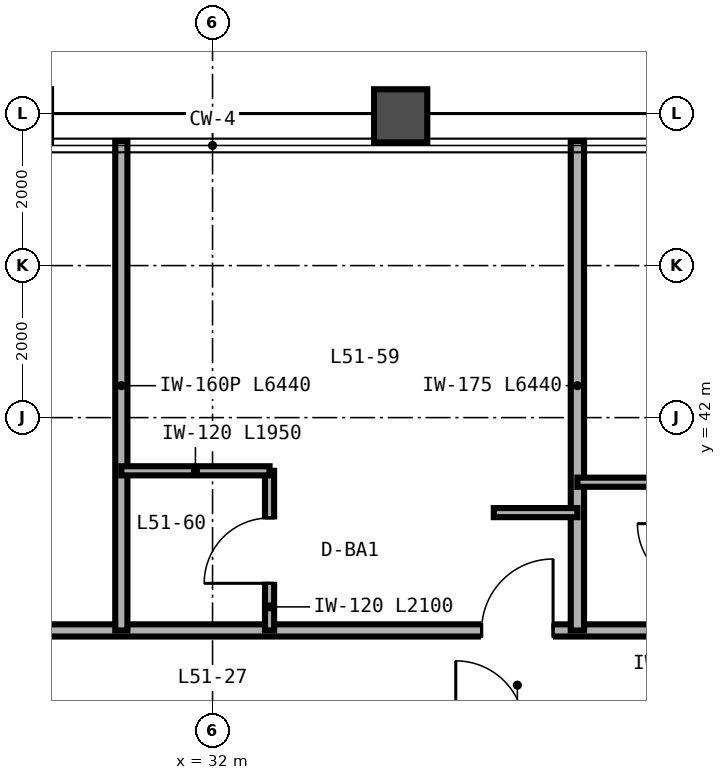
"""IFC4 building model, lengths in metres.
Left out: names, types, materials, properties, quantities, classifications, styles, units other than length and angle.
Written with IfcOpenShell. Run it as: python <this file> out.ifc"""

import sys

from ifc_helpers import new_model, si_unit, direction, frame, frame_2d, origin, place, context, subcontext, project, spatial, rectangle, extrude, source, transform, mapped, element, fill, save


model = new_model("IFC4")
c1 = context("Model", 3, precision=1e-05, world=origin(), true_north=direction((0.0, 1.0)))
c2 = subcontext(c1, "Body", "Model", "MODEL_VIEW")
j1 = project(units=[si_unit("LENGTHUNIT", "METRE"), si_unit("PLANEANGLEUNIT", "RADIAN")], contexts=[c1])
p1 = place(None, origin())
s1 = spatial("IfcSite", under=j1, at=p1, CompositionType="ELEMENT")
p2 = place(p1, origin())
s2 = spatial("IfcBuilding", under=s1, at=p2, CompositionType="ELEMENT")
p3 = place(p2, frame((0.0, 0.0, 202.8)))
s3 = spatial("IfcBuildingStorey", under=s2, at=p3, CompositionType="ELEMENT", Elevation=202.8)
p4 = place(p3, frame((14.0, 39.2, 0.0), z_axis=(0.0, 0.0, 1.0), x_axis=(1.0, 0.0, 0.0)))
e1 = element("IfcWall", 1, at=p4, inside=s3, PredefinedType="PARTITIONING", context=c2, shape_type="SweptSolid", body=[
    extrude(rectangle(XDim=36.0, YDim=0.16, at=frame_2d((18.0, 0.0))), origin(), (0.0, 0.0, 1.0), 2.913),
])
p5 = place(p4, frame((4.14, 0.0, 0.0)))
e2 = element("IfcOpeningElement", 2, at=p5, cuts=e1, PredefinedType="OPENING", context=c2, shape_type="SweptSolid", body=[
    extrude(rectangle(XDim=0.94, YDim=2.15, at=frame_2d((0.47, 1.075))), frame((0.0, 0.09, 0.0), z_axis=(0.0, -1.0, 0.0), x_axis=(1.0, 0.0, 0.0)), (0.0, 0.0, 1.0), 0.18),
])
p6 = place(p4, frame((9.54, 0.0, 0.0)))
e3 = element("IfcOpeningElement", 3, at=p6, cuts=e1, PredefinedType="OPENING", context=c2, shape_type="SweptSolid", body=[
    extrude(rectangle(XDim=0.94, YDim=2.15, at=frame_2d((0.47, 1.075))), frame((0.0, 0.09, 0.0), z_axis=(0.0, -1.0, 0.0), x_axis=(1.0, 0.0, 0.0)), (0.0, 0.0, 1.0), 0.18),
])
p7 = place(p4, frame((13.32, 0.0, 0.0)))
e4 = element("IfcOpeningElement", 4, at=p7, cuts=e1, PredefinedType="OPENING", context=c2, shape_type="SweptSolid", body=[
    extrude(rectangle(XDim=0.96, YDim=2.15, at=frame_2d((0.48, 1.075))), frame((0.0, 0.09, 0.0), z_axis=(0.0, -1.0, 0.0), x_axis=(1.0, 0.0, 0.0)), (0.0, 0.0, 1.0), 0.18),
])
p8 = place(p4, frame((21.54, 0.0, 0.0)))
e5 = element("IfcOpeningElement", 5, at=p8, cuts=e1, PredefinedType="OPENING", context=c2, shape_type="SweptSolid", body=[
    extrude(rectangle(XDim=0.94, YDim=2.15, at=frame_2d((0.47, 1.075))), frame((0.0, 0.09, 0.0), z_axis=(0.0, -1.0, 0.0), x_axis=(1.0, 0.0, 0.0)), (0.0, 0.0, 1.0), 0.18),
])
p9 = place(p4, frame((28.14, 0.0, 0.0)))
e6 = element("IfcOpeningElement", 6, at=p9, cuts=e1, PredefinedType="OPENING", context=c2, shape_type="SweptSolid", body=[
    extrude(rectangle(XDim=0.94, YDim=2.15, at=frame_2d((0.47, 1.075))), frame((0.0, 0.09, 0.0), z_axis=(0.0, -1.0, 0.0), x_axis=(1.0, 0.0, 0.0)), (0.0, 0.0, 1.0), 0.18),
])
p10 = place(p4, frame((34.74, 0.0, 0.0)))
e7 = element("IfcOpeningElement", 7, at=p10, cuts=e1, PredefinedType="OPENING", context=c2, shape_type="SweptSolid", body=[
    extrude(rectangle(XDim=0.94, YDim=2.15, at=frame_2d((0.47, 1.075))), frame((0.0, 0.09, 0.0), z_axis=(0.0, -1.0, 0.0), x_axis=(1.0, 0.0, 0.0)), (0.0, 0.0, 1.0), 0.18),
])
p11 = place(p3, frame((30.8, 39.2, 0.0), z_axis=(0.0, 0.0, 1.0), x_axis=(0.0, 1.0, 0.0)))
e8 = element("IfcWall", 8, at=p11, inside=s3, PredefinedType="PARTITIONING", context=c2, shape_type="SweptSolid", body=[
    extrude(rectangle(XDim=6.44, YDim=0.16, at=frame_2d((3.22, 0.0))), origin(), (0.0, 0.0, 1.0), 2.443),
])
p12 = place(p3, frame((36.8, 39.2, 0.0), z_axis=(0.0, 0.0, 1.0), x_axis=(0.0, 1.0, 0.0)))
e9 = element("IfcWall", 9, at=p12, inside=s3, PredefinedType="PARTITIONING", context=c2, shape_type="SweptSolid", body=[
    extrude(rectangle(XDim=6.44, YDim=0.175, at=frame_2d((3.22, 0.0))), origin(), (0.0, 0.0, 1.0), 2.443),
])
p13 = place(p3, frame((32.75, 39.2, 0.0), z_axis=(0.0, 0.0, 1.0), x_axis=(0.0, 1.0, 0.0)))
e10 = element("IfcWall", 10, at=p13, inside=s3, PredefinedType="PARTITIONING", context=c2, shape_type="SweptSolid", body=[
    extrude(rectangle(XDim=2.1, YDim=0.12, at=frame_2d((1.05, 0.0))), origin(), (0.0, 0.0, 1.0), 3.37),
])
p14 = place(p13, frame((0.62, 0.0, 0.0)))
e11 = element("IfcOpeningElement", 11, at=p14, cuts=e10, PredefinedType="OPENING", context=c2, shape_type="SweptSolid", body=[
    extrude(rectangle(XDim=0.86, YDim=2.1, at=frame_2d((0.43, 1.05))), frame((0.0, 0.07, 0.0), z_axis=(0.0, -1.0, 0.0), x_axis=(1.0, 0.0, 0.0)), (0.0, 0.0, 1.0), 0.14),
])
p15 = place(p3, frame((30.8, 41.3, 0.0), z_axis=(0.0, 0.0, 1.0), x_axis=(1.0, 0.0, 0.0)))
e12 = element("IfcWall", 12, at=p15, inside=s3, PredefinedType="PARTITIONING", context=c2, shape_type="SweptSolid", body=[
    extrude(rectangle(XDim=1.95, YDim=0.12, at=frame_2d((0.975, 0.0))), origin(), (0.0, 0.0, 1.0), 3.37),
])
p16 = place(p3, frame((35.7, 40.75, 0.0), z_axis=(0.0, 0.0, 1.0), x_axis=(1.0, 0.0, 0.0)))
e13 = element("IfcWall", 13, at=p16, inside=s3, PredefinedType="PARTITIONING", context=c2, shape_type="SweptSolid", body=[
    extrude(rectangle(XDim=1.1, YDim=0.12, at=frame_2d((0.55, 0.0))), origin(), (0.0, 0.0, 1.0), 3.37),
])
p17 = place(p3, frame((36.8, 41.15, 0.0), z_axis=(0.0, 0.0, 1.0), x_axis=(1.0, 0.0, 0.0)))
e14 = element("IfcWall", 14, at=p17, inside=s3, PredefinedType="PARTITIONING", context=c2, shape_type="SweptSolid", body=[
    extrude(rectangle(XDim=1.65, YDim=0.12, at=frame_2d((0.825, 0.0))), origin(), (0.0, 0.0, 1.0), 3.37),
])
m1 = source(origin(), c2, "Body", "SweptSolid", [
    extrude(rectangle(XDim=0.86, YDim=2.1, at=frame_2d((0.43, 1.05))), frame((0.0, 0.025, 0.0), z_axis=(0.0, -1.0, 0.0), x_axis=(1.0, 0.0, 0.0)), (0.0, 0.0, 1.0), 0.05),
])
p18 = place(p14, origin())
e15 = element("IfcDoor", 15, at=p18, inside=s3, OperationType="SINGLE_SWING_LEFT", PredefinedType="DOOR", context=c2, shape_type="MappedRepresentation", body=[
    mapped(m1, transform((0.0, 0.0, 0.0), scale=1.0)),
])
fill(e11, e15)
m2 = source(origin(), c2, "Body", "SweptSolid", [
    extrude(rectangle(XDim=0.94, YDim=2.15, at=frame_2d((0.47, 1.075))), frame((0.0, 0.025, 0.0), z_axis=(0.0, -1.0, 0.0), x_axis=(1.0, 0.0, 0.0)), (0.0, 0.0, 1.0), 0.05),
])
p19 = place(p8, origin())
e16 = element("IfcDoor", 16, at=p19, inside=s3, OperationType="SINGLE_SWING_RIGHT", PredefinedType="DOOR", context=c2, shape_type="MappedRepresentation", body=[
    mapped(m2, transform((0.0, 0.0, 0.0), scale=1.0)),
])
fill(e5, e16)
save(model, sys.argv[1])
